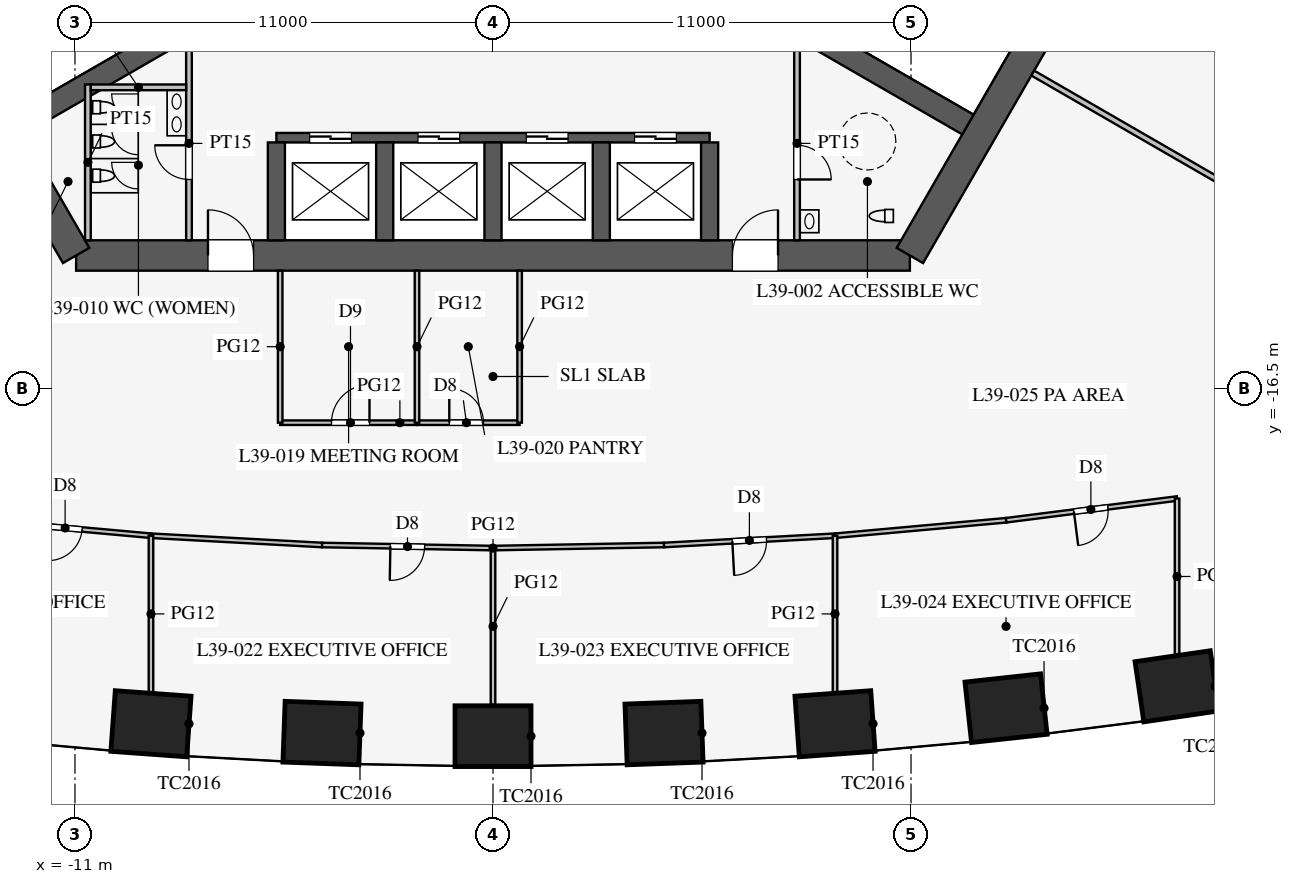
"""IFC4 building model, lengths in metres.
Left out: names, types, materials, properties, quantities, classifications, styles, units other than length and angle.
Written with IfcOpenShell. Run it as: python <this file> out.ifc"""

import sys

from ifc_helpers import new_model, si_unit, direction, frame, frame_2d, origin, origin_2d, place, context, subcontext, project, spatial, rectangle, extrude, element, fill, save


model = new_model("IFC4")
c1 = context("Model", 3, precision=1e-05, world=origin(), true_north=direction((0.0, 1.0)))
c2 = subcontext(c1, "Body", "Model", "MODEL_VIEW")
j1 = project(units=[si_unit("LENGTHUNIT", "METRE"), si_unit("PLANEANGLEUNIT", "RADIAN")], contexts=[c1])
p1 = place(None, origin())
s1 = spatial("IfcSite", under=j1, at=p1, CompositionType="ELEMENT")
p2 = place(p1, origin())
s2 = spatial("IfcBuilding", under=s1, at=p2, CompositionType="ELEMENT")
p3 = place(p2, frame((0.0, 0.0, 170.3)))
s3 = spatial("IfcBuildingStorey", under=s2, at=p3, CompositionType="ELEMENT", Elevation=170.3)
for number, where, z_axis, x_axis in (
    (1, (-9.0, -25.323, 0.0), (0.0, 0.0, 1.0), (0.997, -0.072, 0.0)),
    (2, (-4.5, -25.568, 0.0), (0.0, 0.0, 1.0), (0.999, -0.036, 0.0)),
    (3, (0.0, -25.65, 0.0), (0.0, 0.0, 1.0), (1.0, 0.0, 0.0)),
    (4, (4.5, -25.568, 0.0), (0.0, 0.0, 1.0), (0.999, 0.036, 0.0)),
    (5, (9.0, -25.323, 0.0), (0.0, 0.0, 1.0), (0.997, 0.072, 0.0)),
    (6, (13.5, -24.913, 0.0), (0.0, 0.0, 1.0), (0.994, 0.108, 0.0)),
    (7, (18.0, -24.337, 0.0), (0.0, 0.0, 1.0), (0.99, 0.144, 0.0)),
):
    element("IfcColumn", number, at=place(p3, frame(where, z_axis=z_axis, x_axis=x_axis)), inside=s3, PredefinedType="COLUMN", context=c2, shape_type="SweptSolid", body=[
        extrude(rectangle(XDim=2.0, YDim=1.6, at=origin_2d()), origin(), (0.0, 0.0, 1.0), 4.2),
    ])
p4 = place(p3, frame((-10.97, -13.0, 0.0), z_axis=(0.0, 0.0, 1.0), x_axis=(1.0, 0.0, 0.0)))
e8 = element("IfcWall", 8, at=p4, inside=s3, PredefinedType="SHEAR", context=c2, shape_type="SweptSolid", body=[
    extrude(rectangle(XDim=21.939, YDim=0.8, at=frame_2d((10.97, 0.0))), origin(), (0.0, 0.0, 1.0), 4.2),
])
p5 = place(p4, frame((17.27, 0.0, 0.0)))
e9 = element("IfcOpeningElement", 9, at=p5, cuts=e8, PredefinedType="OPENING", context=c2, shape_type="SweptSolid", body=[
    extrude(rectangle(XDim=1.2, YDim=2.1, at=frame_2d((0.6, 1.05))), frame((0.0, 0.41, 0.0), z_axis=(0.0, -1.0, 0.0), x_axis=(1.0, 0.0, 0.0)), (0.0, 0.0, 1.0), 0.82),
])
p6 = place(p4, frame((3.47, 0.0, 0.0)))
e10 = element("IfcOpeningElement", 10, at=p6, cuts=e8, PredefinedType="OPENING", context=c2, shape_type="SweptSolid", body=[
    extrude(rectangle(XDim=1.2, YDim=2.1, at=frame_2d((0.6, 1.05))), frame((0.0, 0.41, 0.0), z_axis=(0.0, -1.0, 0.0), x_axis=(1.0, 0.0, 0.0)), (0.0, 0.0, 1.0), 0.82),
])
for number, where, z_axis, x_axis in (
    (11, (10.97, -13.0, 0.0), (0.0, 0.0, 1.0), (0.5, 0.866, 0.0)),
    (12, (-16.743, -3.0, 0.0), (0.0, 0.0, 1.0), (0.5, -0.866, 0.0)),
):
    element("IfcWall", number, at=place(p3, frame(where, z_axis=z_axis, x_axis=x_axis)), inside=s3, PredefinedType="SHEAR", context=c2, shape_type="SweptSolid", body=[
        extrude(rectangle(XDim=11.547, YDim=0.8, at=frame_2d((5.773, 0.0))), origin(), (0.0, 0.0, 1.0), 4.2),
    ])
p7 = place(p3, frame((-5.7, -9.9, 0.0), z_axis=(0.0, 0.0, 1.0), x_axis=(1.0, 0.0, 0.0)))
e13 = element("IfcWall", 13, at=p7, inside=s3, PredefinedType="SHEAR", context=c2, shape_type="SweptSolid", body=[
    extrude(rectangle(XDim=11.4, YDim=0.25, at=frame_2d((5.7, 0.0))), origin(), (0.0, 0.0, 1.0), 4.2),
])
p8 = place(p7, frame((0.875, 0.0, 0.0)))
e14 = element("IfcOpeningElement", 14, at=p8, cuts=e13, PredefinedType="OPENING", context=c2, shape_type="SweptSolid", body=[
    extrude(rectangle(XDim=1.1, YDim=2.2, at=frame_2d((0.55, 1.1))), frame((0.0, 0.135, 0.0), z_axis=(0.0, -1.0, 0.0), x_axis=(1.0, 0.0, 0.0)), (0.0, 0.0, 1.0), 0.27),
])
p9 = place(p7, frame((3.725, 0.0, 0.0)))
e15 = element("IfcOpeningElement", 15, at=p9, cuts=e13, PredefinedType="OPENING", context=c2, shape_type="SweptSolid", body=[
    extrude(rectangle(XDim=1.1, YDim=2.2, at=frame_2d((0.55, 1.1))), frame((0.0, 0.135, 0.0), z_axis=(0.0, -1.0, 0.0), x_axis=(1.0, 0.0, 0.0)), (0.0, 0.0, 1.0), 0.27),
])
p10 = place(p7, frame((6.575, 0.0, 0.0)))
e16 = element("IfcOpeningElement", 16, at=p10, cuts=e13, PredefinedType="OPENING", context=c2, shape_type="SweptSolid", body=[
    extrude(rectangle(XDim=1.1, YDim=2.2, at=frame_2d((0.55, 1.1))), frame((0.0, 0.135, 0.0), z_axis=(0.0, -1.0, 0.0), x_axis=(1.0, 0.0, 0.0)), (0.0, 0.0, 1.0), 0.27),
])
p11 = place(p7, frame((9.425, 0.0, 0.0)))
e17 = element("IfcOpeningElement", 17, at=p11, cuts=e13, PredefinedType="OPENING", context=c2, shape_type="SweptSolid", body=[
    extrude(rectangle(XDim=1.1, YDim=2.2, at=frame_2d((0.55, 1.1))), frame((0.0, 0.135, 0.0), z_axis=(0.0, -1.0, 0.0), x_axis=(1.0, 0.0, 0.0)), (0.0, 0.0, 1.0), 0.27),
])
for number, where, z_axis, x_axis in (
    (18, (-5.7, -10.025, 0.0), (0.0, 0.0, 1.0), (0.0, -1.0, 0.0)),
    (19, (-2.85, -10.025, 0.0), (0.0, 0.0, 1.0), (0.0, -1.0, 0.0)),
    (20, (0.0, -10.025, 0.0), (0.0, 0.0, 1.0), (0.0, -1.0, 0.0)),
    (21, (2.85, -10.025, 0.0), (0.0, 0.0, 1.0), (0.0, -1.0, 0.0)),
    (22, (5.7, -10.025, 0.0), (0.0, 0.0, 1.0), (0.0, -1.0, 0.0)),
):
    element("IfcWall", number, at=place(p3, frame(where, z_axis=z_axis, x_axis=x_axis)), inside=s3, PredefinedType="SHEAR", context=c2, shape_type="SweptSolid", body=[
        extrude(rectangle(XDim=2.575, YDim=0.45, at=frame_2d((1.288, 0.0))), origin(), (0.0, 0.0, 1.0), 4.2),
    ])
for number, where, z_axis, x_axis in (
    (23, (4.638, -5.016, 0.0), (0.0, 0.0, 1.0), (0.866, -0.5, 0.0)),
    (24, (-4.638, -5.016, 0.0), (0.0, 0.0, 1.0), (-0.866, -0.5, 0.0)),
):
    element("IfcWall", number, at=place(p3, frame(where, z_axis=z_axis, x_axis=x_axis)), inside=s3, PredefinedType="SHEAR", context=c2, shape_type="SweptSolid", body=[
        extrude(rectangle(XDim=9.075, YDim=0.6, at=frame_2d((4.538, 0.0))), origin(), (0.0, 0.0, 1.0), 4.2),
    ])
p12 = place(p3, frame((8.0, -7.5, 0.0), z_axis=(0.0, 0.0, 1.0), x_axis=(0.0, -1.0, 0.0)))
e25 = element("IfcWall", 25, at=p12, inside=s3, PredefinedType="PARTITIONING", context=c2, shape_type="SweptSolid", body=[
    extrude(rectangle(XDim=5.1, YDim=0.15, at=frame_2d((2.55, 0.0))), origin(), (0.0, 0.0, 1.0), 4.0),
])
p13 = place(p12, frame((2.6, 0.0, 0.0)))
e26 = element("IfcOpeningElement", 26, at=p13, cuts=e25, PredefinedType="OPENING", context=c2, shape_type="SweptSolid", body=[
    extrude(rectangle(XDim=0.9, YDim=2.1, at=frame_2d((0.45, 1.05))), frame((0.0, 0.085, 0.0), z_axis=(0.0, -1.0, 0.0), x_axis=(1.0, 0.0, 0.0)), (0.0, 0.0, 1.0), 0.17),
])
p14 = place(p3, frame((-8.0, -7.5, 0.0), z_axis=(0.0, 0.0, 1.0), x_axis=(0.0, -1.0, 0.0)))
e27 = element("IfcWall", 27, at=p14, inside=s3, PredefinedType="PARTITIONING", context=c2, shape_type="SweptSolid", body=[
    extrude(rectangle(XDim=5.1, YDim=0.15, at=frame_2d((2.55, 0.0))), origin(), (0.0, 0.0, 1.0), 4.0),
])
p15 = place(p14, frame((2.6, 0.0, 0.0)))
e28 = element("IfcOpeningElement", 28, at=p15, cuts=e27, PredefinedType="OPENING", context=c2, shape_type="SweptSolid", body=[
    extrude(rectangle(XDim=0.9, YDim=2.1, at=frame_2d((0.45, 1.05))), frame((0.0, 0.085, 0.0), z_axis=(0.0, -1.0, 0.0), x_axis=(1.0, 0.0, 0.0)), (0.0, 0.0, 1.0), 0.17),
])
p16 = place(p3, frame((-10.66, -8.5, 0.0), z_axis=(0.0, 0.0, 1.0), x_axis=(0.0, -1.0, 0.0)))
e29 = element("IfcWall", 29, at=p16, inside=s3, PredefinedType="PARTITIONING", context=c2, shape_type="SweptSolid", body=[
    extrude(rectangle(XDim=4.1, YDim=0.15, at=frame_2d((2.05, 0.0))), origin(), (0.0, 0.0, 1.0), 4.0),
])
p17 = place(p3, frame((-8.075, -8.575, 0.0), z_axis=(0.0, 0.0, 1.0), x_axis=(-1.0, 0.0, 0.0)))
e30 = element("IfcWall", 30, at=p17, inside=s3, PredefinedType="PARTITIONING", context=c2, shape_type="SweptSolid", body=[
    extrude(rectangle(XDim=2.51, YDim=0.15, at=frame_2d((1.255, 0.0))), origin(), (0.0, 0.0, 1.0), 4.0),
])
p18 = place(p3, frame((14.203, -8.2, 0.0), z_axis=(0.0, 0.0, 1.0), x_axis=(0.866024668836, -0.500001272966, 0.0)))
e31 = element("IfcWall", 31, at=p18, inside=s3, PredefinedType="PARTITIONING", context=c2, shape_type="SweptSolid", body=[
    extrude(rectangle(XDim=16.65, YDim=0.15, at=frame_2d((8.325, 0.0))), origin(), (0.0, 0.0, 1.0), 2.3),
])
p19 = place(p3, frame((-2.0, -17.4, 0.0), z_axis=(0.0, 0.0, 1.0), x_axis=(1.0, 0.0, 0.0)))
e32 = element("IfcWall", 32, at=p19, inside=s3, PredefinedType="PARTITIONING", context=c2, shape_type="SweptSolid", body=[
    extrude(rectangle(XDim=2.7, YDim=0.12, at=frame_2d((1.35, 0.0))), origin(), (0.0, 0.0, 1.0), 2.9),
])
p20 = place(p19, frame((0.85, 0.0, 0.15)))
e33 = element("IfcOpeningElement", 33, at=p20, cuts=e32, PredefinedType="OPENING", context=c2, shape_type="SweptSolid", body=[
    extrude(rectangle(XDim=0.9, YDim=2.1, at=frame_2d((0.45, 1.05))), frame((0.0, 0.07, 0.0), z_axis=(0.0, -1.0, 0.0), x_axis=(1.0, 0.0, 0.0)), (0.0, 0.0, 1.0), 0.14),
])
p21 = place(p3, frame((-5.6, -17.4, 0.0), z_axis=(0.0, 0.0, 1.0), x_axis=(1.0, 0.0, 0.0)))
e34 = element("IfcWall", 34, at=p21, inside=s3, PredefinedType="PARTITIONING", context=c2, shape_type="SweptSolid", body=[
    extrude(rectangle(XDim=3.6, YDim=0.12, at=frame_2d((1.8, 0.0))), origin(), (0.0, 0.0, 1.0), 2.9),
])
p22 = place(p21, frame((1.35, 0.0, 0.15)))
e35 = element("IfcOpeningElement", 35, at=p22, cuts=e34, PredefinedType="OPENING", context=c2, shape_type="SweptSolid", body=[
    extrude(rectangle(XDim=1.0, YDim=2.1, at=frame_2d((0.5, 1.05))), frame((0.0, 0.07, 0.0), z_axis=(0.0, -1.0, 0.0), x_axis=(1.0, 0.0, 0.0)), (0.0, 0.0, 1.0), 0.14),
])
for number, where, z_axis, x_axis in (
    (36, (0.7, -13.4, 0.0), (0.0, 0.0, 1.0), (0.0, -1.0, 0.0)),
    (37, (-2.0, -13.4, 0.0), (0.0, 0.0, 1.0), (0.0, -1.0, 0.0)),
    (38, (-5.6, -13.4, 0.0), (0.0, 0.0, 1.0), (0.0, -1.0, 0.0)),
):
    element("IfcWall", number, at=place(p3, frame(where, z_axis=z_axis, x_axis=x_axis)), inside=s3, PredefinedType="PARTITIONING", context=c2, shape_type="SweptSolid", body=[
        extrude(rectangle(XDim=4.0, YDim=0.12, at=frame_2d((2.0, 0.0))), origin(), (0.0, 0.0, 1.0), 2.9),
    ])
p23 = place(p3, frame((0.0, -20.7, 0.0), z_axis=(0.0, 0.0, 1.0), x_axis=(0.999837820638, 0.018009231578, 0.0)))
e39 = element("IfcWall", 39, at=p23, inside=s3, PredefinedType="PARTITIONING", context=c2, shape_type="SweptSolid", body=[
    extrude(rectangle(XDim=4.501, YDim=0.12, at=frame_2d((2.25, 0.0))), origin(), (0.0, 0.0, 1.0), 2.9),
])
p24 = place(p3, frame((13.5, -19.968, 0.0), z_axis=(0.0, 0.0, 1.0), x_axis=(0.992010652594, 0.12615413247, 0.0)))
e40 = element("IfcWall", 40, at=p24, inside=s3, PredefinedType="PARTITIONING", context=c2, shape_type="SweptSolid", body=[
    extrude(rectangle(XDim=4.536, YDim=0.12, at=frame_2d((2.268, 0.0))), origin(), (0.0, 0.0, 1.0), 2.9),
])
p25 = place(p24, frame((1.8, 0.0, 0.15)))
e41 = element("IfcOpeningElement", 41, at=p25, cuts=e40, PredefinedType="OPENING", context=c2, shape_type="SweptSolid", body=[
    extrude(rectangle(XDim=0.9, YDim=2.1, at=frame_2d((0.45, 1.05))), frame((0.0, 0.07, 0.0), z_axis=(0.0, -1.0, 0.0), x_axis=(1.0, 0.0, 0.0)), (0.0, 0.0, 1.0), 0.14),
])
p26 = place(p3, frame((4.5, -20.619, 0.0), z_axis=(0.0, 0.0, 1.0), x_axis=(0.998537376538, 0.054065771581, 0.0)))
e42 = element("IfcWall", 42, at=p26, inside=s3, PredefinedType="PARTITIONING", context=c2, shape_type="SweptSolid", body=[
    extrude(rectangle(XDim=4.507, YDim=0.12, at=frame_2d((2.253, 0.0))), origin(), (0.0, 0.0, 1.0), 2.9),
])
p27 = place(p26, frame((1.8, 0.0, 0.15)))
e43 = element("IfcOpeningElement", 43, at=p27, cuts=e42, PredefinedType="OPENING", context=c2, shape_type="SweptSolid", body=[
    extrude(rectangle(XDim=0.9, YDim=2.1, at=frame_2d((0.45, 1.05))), frame((0.0, 0.07, 0.0), z_axis=(0.0, -1.0, 0.0), x_axis=(1.0, 0.0, 0.0)), (0.0, 0.0, 1.0), 0.14),
])
p28 = place(p3, frame((9.0, -20.375, 0.0), z_axis=(0.0, 0.0, 1.0), x_axis=(0.995930325215, 0.090126507295, 0.0)))
e44 = element("IfcWall", 44, at=p28, inside=s3, PredefinedType="PARTITIONING", context=c2, shape_type="SweptSolid", body=[
    extrude(rectangle(XDim=4.518, YDim=0.12, at=frame_2d((2.259, 0.0))), origin(), (0.0, 0.0, 1.0), 2.9),
])
p29 = place(p3, frame((-13.5, -19.968, 0.0), z_axis=(0.0, 0.0, 1.0), x_axis=(0.995930325215, -0.090126507295, 0.0)))
e45 = element("IfcWall", 45, at=p29, inside=s3, PredefinedType="PARTITIONING", context=c2, shape_type="SweptSolid", body=[
    extrude(rectangle(XDim=4.518, YDim=0.12, at=frame_2d((2.259, 0.0))), origin(), (0.0, 0.0, 1.0), 2.9),
])
p30 = place(p29, frame((1.8, 0.0, 0.15)))
e46 = element("IfcOpeningElement", 46, at=p30, cuts=e45, PredefinedType="OPENING", context=c2, shape_type="SweptSolid", body=[
    extrude(rectangle(XDim=0.9, YDim=2.1, at=frame_2d((0.45, 1.05))), frame((0.0, 0.07, 0.0), z_axis=(0.0, -1.0, 0.0), x_axis=(1.0, 0.0, 0.0)), (0.0, 0.0, 1.0), 0.14),
])
p31 = place(p3, frame((-4.5, -20.619, 0.0), z_axis=(0.0, 0.0, 1.0), x_axis=(0.999837820638, -0.018009231578, 0.0)))
e47 = element("IfcWall", 47, at=p31, inside=s3, PredefinedType="PARTITIONING", context=c2, shape_type="SweptSolid", body=[
    extrude(rectangle(XDim=4.501, YDim=0.12, at=frame_2d((2.25, 0.0))), origin(), (0.0, 0.0, 1.0), 2.9),
])
p32 = place(p31, frame((1.8, 0.0, 0.15)))
e48 = element("IfcOpeningElement", 48, at=p32, cuts=e47, PredefinedType="OPENING", context=c2, shape_type="SweptSolid", body=[
    extrude(rectangle(XDim=0.9, YDim=2.1, at=frame_2d((0.45, 1.05))), frame((0.0, 0.07, 0.0), z_axis=(0.0, -1.0, 0.0), x_axis=(1.0, 0.0, 0.0)), (0.0, 0.0, 1.0), 0.14),
])
p33 = place(p3, frame((-9.0, -20.375, 0.0), z_axis=(0.0, 0.0, 1.0), x_axis=(0.998537376538, -0.054065771581, 0.0)))
e49 = element("IfcWall", 49, at=p33, inside=s3, PredefinedType="PARTITIONING", context=c2, shape_type="SweptSolid", body=[
    extrude(rectangle(XDim=4.507, YDim=0.12, at=frame_2d((2.253, 0.0))), origin(), (0.0, 0.0, 1.0), 2.9),
])
p34 = place(p3, frame((0.0, -20.7, 0.0), z_axis=(0.0, 0.0, 1.0), x_axis=(0.0, -1.0, 0.0)))
e50 = element("IfcWall", 50, at=p34, inside=s3, PredefinedType="PARTITIONING", context=c2, shape_type="SweptSolid", body=[
    extrude(rectangle(XDim=4.12, YDim=0.12, at=frame_2d((2.06, 0.0))), origin(), (0.0, 0.0, 1.0), 2.6),
])
p35 = place(p3, frame((18.0, -19.396, 0.0), z_axis=(0.0, 0.0, 1.0), x_axis=(0.0, -1.0, 0.0)))
e51 = element("IfcWall", 51, at=p35, inside=s3, PredefinedType="PARTITIONING", context=c2, shape_type="SweptSolid", body=[
    extrude(rectangle(XDim=4.103, YDim=0.12, at=frame_2d((2.052, 0.0))), origin(), (0.0, 0.0, 1.0), 2.4),
])
for number, where, z_axis, x_axis in (
    (52, (9.0, -20.375, 0.0), (0.0, 0.0, 1.0), (0.0, -1.0, 0.0)),
    (53, (-9.0, -20.375, 0.0), (0.0, 0.0, 1.0), (0.0, -1.0, 0.0)),
):
    element("IfcWall", number, at=place(p3, frame(where, z_axis=z_axis, x_axis=x_axis)), inside=s3, PredefinedType="PARTITIONING", context=c2, shape_type="SweptSolid", body=[
        extrude(rectangle(XDim=4.116, YDim=0.12, at=frame_2d((2.058, 0.0))), origin(), (0.0, 0.0, 1.0), 2.6),
    ])
p36 = place(p3, frame((-0.016, 30.491, 0.0), z_axis=(0.0, 0.0, 1.0), x_axis=(-0.50000091641, -0.866024874695, 0.0)))
e54 = element("IfcWall", 54, at=p36, inside=s3, PredefinedType="PARTITIONING", context=c2, shape_type="SweptSolid", body=[
    extrude(rectangle(XDim=52.796, YDim=0.12, at=frame_2d((26.398, 0.0))), origin(), (0.0, 0.0, 1.0), 2.9),
])
p37 = place(p36, frame((10.2, 0.0, 0.15)))
e55 = element("IfcOpeningElement", 55, at=p37, cuts=e54, PredefinedType="OPENING", context=c2, shape_type="SweptSolid", body=[
    extrude(rectangle(XDim=1.8, YDim=2.1, at=frame_2d((0.9, 1.05))), frame((0.0, 0.07, 0.0), z_axis=(0.0, -1.0, 0.0), x_axis=(1.0, 0.0, 0.0)), (0.0, 0.0, 1.0), 0.14),
])
p38 = place(p36, frame((40.8, 0.0, 0.15)))
e56 = element("IfcOpeningElement", 56, at=p38, cuts=e54, PredefinedType="OPENING", context=c2, shape_type="SweptSolid", body=[
    extrude(rectangle(XDim=1.8, YDim=2.1, at=frame_2d((0.9, 1.05))), frame((0.0, 0.07, 0.0), z_axis=(0.0, -1.0, 0.0), x_axis=(1.0, 0.0, 0.0)), (0.0, 0.0, 1.0), 0.14),
])
p39 = place(p13, origin())
e57 = element("IfcDoor", 57, at=p39, inside=s3, OperationType="SINGLE_SWING_RIGHT", PredefinedType="DOOR", context=c2, shape_type="SweptSolid", body=[
    extrude(rectangle(XDim=0.9, YDim=2.1, at=frame_2d((0.45, 1.05))), frame((0.0, 0.025, 0.0), z_axis=(0.0, -1.0, 0.0), x_axis=(1.0, 0.0, 0.0)), (0.0, 0.0, 1.0), 0.05),
])
fill(e26, e57)
p40 = place(p15, frame((0.9, 0.0, 0.0), z_axis=(0.0, 0.0, 1.0), x_axis=(-1.0, 0.0, 0.0)))
e58 = element("IfcDoor", 58, at=p40, inside=s3, OperationType="SINGLE_SWING_RIGHT", PredefinedType="DOOR", context=c2, shape_type="SweptSolid", body=[
    extrude(rectangle(XDim=0.9, YDim=2.1, at=frame_2d((0.45, 1.05))), frame((0.0, 0.025, 0.0), z_axis=(0.0, -1.0, 0.0), x_axis=(1.0, 0.0, 0.0)), (0.0, 0.0, 1.0), 0.05),
])
fill(e28, e58)
p41 = place(p5, origin())
e59 = element("IfcDoor", 59, at=p41, inside=s3, OperationType="SINGLE_SWING_RIGHT", PredefinedType="DOOR", context=c2, shape_type="SweptSolid", body=[
    extrude(rectangle(XDim=1.2, YDim=2.1, at=frame_2d((0.6, 1.05))), frame((0.0, 0.025, 0.0), z_axis=(0.0, -1.0, 0.0), x_axis=(1.0, 0.0, 0.0)), (0.0, 0.0, 1.0), 0.05),
])
fill(e9, e59)
p42 = place(p6, origin())
e60 = element("IfcDoor", 60, at=p42, inside=s3, OperationType="SINGLE_SWING_LEFT", PredefinedType="DOOR", context=c2, shape_type="SweptSolid", body=[
    extrude(rectangle(XDim=1.2, YDim=2.1, at=frame_2d((0.6, 1.05))), frame((0.0, 0.025, 0.0), z_axis=(0.0, -1.0, 0.0), x_axis=(1.0, 0.0, 0.0)), (0.0, 0.0, 1.0), 0.05),
])
fill(e10, e60)
p43 = place(p22, origin())
e61 = element("IfcDoor", 61, at=p43, inside=s3, OperationType="SINGLE_SWING_RIGHT", PredefinedType="DOOR", context=c2, shape_type="SweptSolid", body=[
    extrude(rectangle(XDim=1.0, YDim=2.1, at=frame_2d((0.5, 1.05))), frame((0.0, 0.025, 0.0), z_axis=(0.0, -1.0, 0.0), x_axis=(1.0, 0.0, 0.0)), (0.0, 0.0, 1.0), 0.05),
])
fill(e35, e61)
p44 = place(p20, origin())
e62 = element("IfcDoor", 62, at=p44, inside=s3, OperationType="SINGLE_SWING_LEFT", PredefinedType="DOOR", context=c2, shape_type="SweptSolid", body=[
    extrude(rectangle(XDim=0.9, YDim=2.1, at=frame_2d((0.45, 1.05))), frame((0.0, 0.025, 0.0), z_axis=(0.0, -1.0, 0.0), x_axis=(1.0, 0.0, 0.0)), (0.0, 0.0, 1.0), 0.05),
])
fill(e33, e62)
p45 = place(p30, frame((0.9, 0.0, 0.0), z_axis=(0.0, 0.0, 1.0), x_axis=(-1.0, 0.0, 0.0)))
e63 = element("IfcDoor", 63, at=p45, inside=s3, OperationType="SINGLE_SWING_RIGHT", PredefinedType="DOOR", context=c2, shape_type="SweptSolid", body=[
    extrude(rectangle(XDim=0.9, YDim=2.1, at=frame_2d((0.45, 1.05))), frame((0.0, 0.025, 0.0), z_axis=(0.0, -1.0, 0.0), x_axis=(1.0, 0.0, 0.0)), (0.0, 0.0, 1.0), 0.05),
])
fill(e46, e63)
p46 = place(p32, frame((0.9, 0.0, 0.0), z_axis=(0.0, 0.0, 1.0), x_axis=(-1.0, 0.0, 0.0)))
e64 = element("IfcDoor", 64, at=p46, inside=s3, OperationType="SINGLE_SWING_RIGHT", PredefinedType="DOOR", context=c2, shape_type="SweptSolid", body=[
    extrude(rectangle(XDim=0.9, YDim=2.1, at=frame_2d((0.45, 1.05))), frame((0.0, 0.025, 0.0), z_axis=(0.0, -1.0, 0.0), x_axis=(1.0, 0.0, 0.0)), (0.0, 0.0, 1.0), 0.05),
])
fill(e48, e64)
p47 = place(p27, frame((0.9, 0.0, 0.0), z_axis=(0.0, 0.0, 1.0), x_axis=(-1.0, 0.0, 0.0)))
e65 = element("IfcDoor", 65, at=p47, inside=s3, OperationType="SINGLE_SWING_RIGHT", PredefinedType="DOOR", context=c2, shape_type="SweptSolid", body=[
    extrude(rectangle(XDim=0.9, YDim=2.1, at=frame_2d((0.45, 1.05))), frame((0.0, 0.025, 0.0), z_axis=(0.0, -1.0, 0.0), x_axis=(1.0, 0.0, 0.0)), (0.0, 0.0, 1.0), 0.05),
])
fill(e43, e65)
p48 = place(p25, frame((0.9, 0.0, 0.0), z_axis=(0.0, 0.0, 1.0), x_axis=(-1.0, 0.0, 0.0)))
e66 = element("IfcDoor", 66, at=p48, inside=s3, OperationType="SINGLE_SWING_RIGHT", PredefinedType="DOOR", context=c2, shape_type="SweptSolid", body=[
    extrude(rectangle(XDim=0.9, YDim=2.1, at=frame_2d((0.45, 1.05))), frame((0.0, 0.025, 0.0), z_axis=(0.0, -1.0, 0.0), x_axis=(1.0, 0.0, 0.0)), (0.0, 0.0, 1.0), 0.05),
])
fill(e41, e66)
p49 = place(p8, origin())
e67 = element("IfcDoor", 67, at=p49, inside=s3, OperationType="DOUBLE_DOOR_SLIDING", PredefinedType="DOOR", context=c2, shape_type="SweptSolid", body=[
    extrude(rectangle(XDim=1.1, YDim=2.2, at=frame_2d((0.55, 1.1))), frame((0.0, 0.025, 0.0), z_axis=(0.0, -1.0, 0.0), x_axis=(1.0, 0.0, 0.0)), (0.0, 0.0, 1.0), 0.05),
])
fill(e14, e67)
p50 = place(p9, origin())
e68 = element("IfcDoor", 68, at=p50, inside=s3, OperationType="DOUBLE_DOOR_SLIDING", PredefinedType="DOOR", context=c2, shape_type="SweptSolid", body=[
    extrude(rectangle(XDim=1.1, YDim=2.2, at=frame_2d((0.55, 1.1))), frame((0.0, 0.025, 0.0), z_axis=(0.0, -1.0, 0.0), x_axis=(1.0, 0.0, 0.0)), (0.0, 0.0, 1.0), 0.05),
])
fill(e15, e68)
p51 = place(p10, origin())
e69 = element("IfcDoor", 69, at=p51, inside=s3, OperationType="DOUBLE_DOOR_SLIDING", PredefinedType="DOOR", context=c2, shape_type="SweptSolid", body=[
    extrude(rectangle(XDim=1.1, YDim=2.2, at=frame_2d((0.55, 1.1))), frame((0.0, 0.025, 0.0), z_axis=(0.0, -1.0, 0.0), x_axis=(1.0, 0.0, 0.0)), (0.0, 0.0, 1.0), 0.05),
])
fill(e16, e69)
p52 = place(p11, origin())
e70 = element("IfcDoor", 70, at=p52, inside=s3, OperationType="DOUBLE_DOOR_SLIDING", PredefinedType="DOOR", context=c2, shape_type="SweptSolid", body=[
    extrude(rectangle(XDim=1.1, YDim=2.2, at=frame_2d((0.55, 1.1))), frame((0.0, 0.025, 0.0), z_axis=(0.0, -1.0, 0.0), x_axis=(1.0, 0.0, 0.0)), (0.0, 0.0, 1.0), 0.05),
])
fill(e17, e70)
save(model, sys.argv[1])
